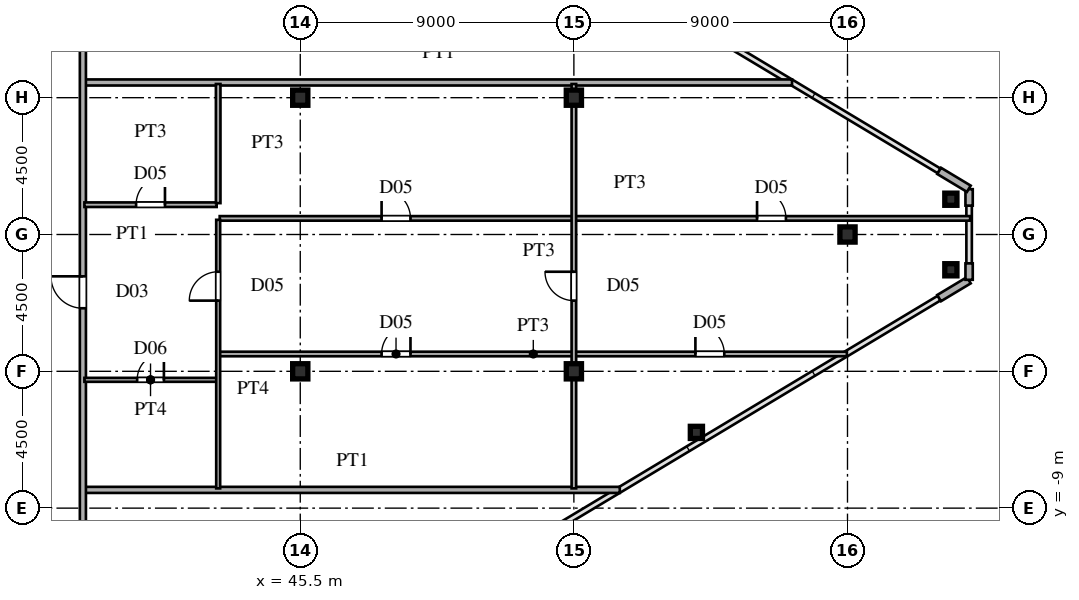
"""IFC4 building model, lengths in metres.
Left out: names, types, materials, properties, quantities, classifications, styles, units other than length and angle.
Written with IfcOpenShell. Run it as: python <this file> out.ifc"""

import sys

from ifc_helpers import new_model, si_unit, direction, frame, frame_2d, origin, origin_2d, place, context, subcontext, project, spatial, rectangle, hollow_rectangle, i_section, extrude, source, transform, mapped, element, fill, save


model = new_model("IFC4")
c1 = context("Model", 3, precision=1e-05, world=origin(), true_north=direction((0.0, 1.0)))
c2 = subcontext(c1, "Body", "Model", "MODEL_VIEW")
j1 = project(units=[si_unit("LENGTHUNIT", "METRE"), si_unit("PLANEANGLEUNIT", "RADIAN")], contexts=[c1])
p1 = place(None, origin())
s1 = spatial("IfcSite", under=j1, at=p1, CompositionType="ELEMENT")
p2 = place(p1, origin())
s2 = spatial("IfcBuilding", under=s1, at=p2, CompositionType="ELEMENT")
p3 = place(p2, frame((0.0, 0.0, 217.5)))
s3 = spatial("IfcBuildingStorey", under=s2, at=p3, CompositionType="ELEMENT", Elevation=217.5)
m1 = source(origin(), c2, "Body", "SweptSolid", [
    extrude(i_section(OverallWidth=0.5, OverallDepth=0.5, WebThickness=0.02, FlangeThickness=0.032, at=origin_2d()), origin(), (0.0, 0.0, 1.0), 3.6),
])
for number, where, z_axis, x_axis in (
    (1, (45.5, -4.5, 0.0), (0.0, 0.0, 1.0), (1.0, 0.0, 0.0)),
    (2, (45.5, 4.5, 0.0), (0.0, 0.0, 1.0), (1.0, 0.0, 0.0)),
    (3, (54.5, -4.5, 0.0), (0.0, 0.0, 1.0), (1.0, 0.0, 0.0)),
    (4, (54.5, 4.5, 0.0), (0.0, 0.0, 1.0), (1.0, 0.0, 0.0)),
    (5, (63.5, 0.0, 0.0), (0.0, 0.0, 1.0), (1.0, 0.0, 0.0)),
):
    element("IfcColumn", number, at=place(p3, frame(where, z_axis=z_axis, x_axis=x_axis)), inside=s3, PredefinedType="COLUMN", context=c2, shape_type="MappedRepresentation", body=[
        mapped(m1, transform((0.0, 0.0, 0.0), scale=1.0)),
    ])
m2 = source(origin(), c2, "Body", "SweptSolid", [
    extrude(hollow_rectangle(XDim=0.4, YDim=0.4, WallThickness=0.016, at=origin_2d()), origin(), (0.0, 0.0, 1.0), 3.6),
])
for number, where, z_axis, x_axis in (
    (6, (66.9, -1.16, 0.0), (0.0, 0.0, 1.0), (1.0, 0.0, 0.0)),
    (7, (66.9, 1.16, 0.0), (0.0, 0.0, 1.0), (1.0, 0.0, 0.0)),
    (8, (58.53, -6.509, 0.0), (0.0, 0.0, 1.0), (1.0, 0.0, 0.0)),
):
    element("IfcColumn", number, at=place(p3, frame(where, z_axis=z_axis, x_axis=x_axis)), inside=s3, PredefinedType="COLUMN", context=c2, shape_type="MappedRepresentation", body=[
        mapped(m2, transform((0.0, 0.0, 0.0), scale=1.0)),
    ])
p4 = place(p3, frame((66.514, -2.092, 0.0), z_axis=(0.0, 0.0, 1.0), x_axis=(0.85743623509, 0.514590228002, 0.0)))
e9 = element("IfcWall", 9, at=p4, inside=s3, PredefinedType="SOLIDWALL", context=c2, shape_type="SweptSolid", body=[
    extrude(rectangle(XDim=1.14, YDim=0.24, at=frame_2d((0.57, 0.0))), origin(), (0.0, 0.0, 1.0), 3.38),
])
for number, where, z_axis, x_axis in (
    (10, (67.5, -1.49, 0.0), (0.0, 0.0, 1.0), (0.0, 1.0, 0.0)),
    (11, (67.5, 0.95, 0.0), (0.0, 0.0, 1.0), (0.0, 1.0, 0.0)),
):
    element("IfcWall", number, at=place(p3, frame(where, z_axis=z_axis, x_axis=x_axis)), inside=s3, PredefinedType="SOLIDWALL", context=c2, shape_type="SweptSolid", body=[
        extrude(rectangle(XDim=0.54, YDim=0.24, at=frame_2d((0.27, 0.0))), origin(), (0.0, 0.0, 1.0), 3.38),
    ])
p5 = place(p3, frame((67.491, 1.505, 0.0), z_axis=(0.0, 0.0, 1.0), x_axis=(-0.85743623509, 0.514590228002, 0.0)))
e12 = element("IfcWall", 12, at=p5, inside=s3, PredefinedType="SOLIDWALL", context=c2, shape_type="SweptSolid", body=[
    extrude(rectangle(XDim=1.14, YDim=0.24, at=frame_2d((0.57, 0.0))), origin(), (0.0, 0.0, 1.0), 3.38),
])
p6 = place(p3, frame((38.43, -8.4, 0.0), z_axis=(0.0, 0.0, 1.0), x_axis=(1.0, 0.0, 0.0)))
e13 = element("IfcWall", 13, at=p6, inside=s3, PredefinedType="PARTITIONING", context=c2, shape_type="SweptSolid", body=[
    extrude(rectangle(XDim=17.58, YDim=0.2, at=frame_2d((8.79, 0.0))), origin(), (0.0, 0.0, 1.0), 3.38),
])
p7 = place(p3, frame((38.4, -4.78, 0.0), z_axis=(0.0, 0.0, 1.0), x_axis=(1.0, 0.0, 0.0)))
e14 = element("IfcWall", 14, at=p7, inside=s3, PredefinedType="PARTITIONING", context=c2, shape_type="SweptSolid", body=[
    extrude(rectangle(XDim=4.35, YDim=0.13, at=frame_2d((2.175, 0.0))), origin(), (0.0, 0.0, 1.0), 3.38),
])
p8 = place(p7, frame((1.735, 0.0, 0.0)))
e15 = element("IfcOpeningElement", 15, at=p8, cuts=e14, PredefinedType="OPENING", context=c2, shape_type="SweptSolid", body=[
    extrude(rectangle(XDim=0.88, YDim=2.1, at=frame_2d((0.44, 1.05))), frame((0.0, 0.075, 0.0), z_axis=(0.0, -1.0, 0.0), x_axis=(1.0, 0.0, 0.0)), (0.0, 0.0, 1.0), 0.15),
])
p9 = place(p3, frame((42.85, -3.93, 0.0), z_axis=(0.0, 0.0, 1.0), x_axis=(1.0, 0.0, 0.0)))
e16 = element("IfcWall", 16, at=p9, inside=s3, PredefinedType="PARTITIONING", context=c2, shape_type="SweptSolid", body=[
    extrude(rectangle(XDim=20.63, YDim=0.15, at=frame_2d((10.315, 0.0))), origin(), (0.0, 0.0, 1.0), 3.38),
])
p10 = place(p9, frame((5.325, 0.0, 0.0)))
e17 = element("IfcOpeningElement", 17, at=p10, cuts=e16, PredefinedType="OPENING", context=c2, shape_type="SweptSolid", body=[
    extrude(rectangle(XDim=0.95, YDim=2.15, at=frame_2d((0.475, 1.075))), frame((0.0, 0.085, 0.0), z_axis=(0.0, -1.0, 0.0), x_axis=(1.0, 0.0, 0.0)), (0.0, 0.0, 1.0), 0.17),
])
p11 = place(p9, frame((15.647, 0.0, 0.0)))
e18 = element("IfcOpeningElement", 18, at=p11, cuts=e16, PredefinedType="OPENING", context=c2, shape_type="SweptSolid", body=[
    extrude(rectangle(XDim=0.95, YDim=2.15, at=frame_2d((0.475, 1.075))), frame((0.0, 0.085, 0.0), z_axis=(0.0, -1.0, 0.0), x_axis=(1.0, 0.0, 0.0)), (0.0, 0.0, 1.0), 0.17),
])
p12 = place(p3, frame((42.85, 0.53, 0.0), z_axis=(0.0, 0.0, 1.0), x_axis=(1.0, 0.0, 0.0)))
e19 = element("IfcWall", 19, at=p12, inside=s3, PredefinedType="PARTITIONING", context=c2, shape_type="SweptSolid", body=[
    extrude(rectangle(XDim=24.685, YDim=0.15, at=frame_2d((12.342, 0.0))), origin(), (0.0, 0.0, 1.0), 3.38),
])
p13 = place(p12, frame((5.325, 0.0, 0.0)))
e20 = element("IfcOpeningElement", 20, at=p13, cuts=e19, PredefinedType="OPENING", context=c2, shape_type="SweptSolid", body=[
    extrude(rectangle(XDim=0.95, YDim=2.15, at=frame_2d((0.475, 1.075))), frame((0.0, 0.085, 0.0), z_axis=(0.0, -1.0, 0.0), x_axis=(1.0, 0.0, 0.0)), (0.0, 0.0, 1.0), 0.17),
])
p14 = place(p12, frame((17.675, 0.0, 0.0)))
e21 = element("IfcOpeningElement", 21, at=p14, cuts=e19, PredefinedType="OPENING", context=c2, shape_type="SweptSolid", body=[
    extrude(rectangle(XDim=0.95, YDim=2.15, at=frame_2d((0.475, 1.075))), frame((0.0, 0.085, 0.0), z_axis=(0.0, -1.0, 0.0), x_axis=(1.0, 0.0, 0.0)), (0.0, 0.0, 1.0), 0.17),
])
p15 = place(p3, frame((38.4, 0.98, 0.0), z_axis=(0.0, 0.0, 1.0), x_axis=(1.0, 0.0, 0.0)))
e22 = element("IfcWall", 22, at=p15, inside=s3, PredefinedType="PARTITIONING", context=c2, shape_type="SweptSolid", body=[
    extrude(rectangle(XDim=4.35, YDim=0.15, at=frame_2d((2.175, 0.0))), origin(), (0.0, 0.0, 1.0), 3.38),
])
p16 = place(p15, frame((1.7, 0.0, 0.0)))
e23 = element("IfcOpeningElement", 23, at=p16, cuts=e22, PredefinedType="OPENING", context=c2, shape_type="SweptSolid", body=[
    extrude(rectangle(XDim=0.95, YDim=2.15, at=frame_2d((0.475, 1.075))), frame((0.0, 0.085, 0.0), z_axis=(0.0, -1.0, 0.0), x_axis=(1.0, 0.0, 0.0)), (0.0, 0.0, 1.0), 0.17),
])
p17 = place(p3, frame((38.43, 5.0, 0.0), z_axis=(0.0, 0.0, 1.0), x_axis=(1.0, 0.0, 0.0)))
e24 = element("IfcWall", 24, at=p17, inside=s3, PredefinedType="PARTITIONING", context=c2, shape_type="SweptSolid", body=[
    extrude(rectangle(XDim=23.246, YDim=0.2, at=frame_2d((11.623, 0.0))), origin(), (0.0, 0.0, 1.0), 3.38),
])
p18 = place(p3, frame((38.35, -15.715, 0.0), z_axis=(0.0, 0.0, 1.0), x_axis=(0.0, 1.0, 0.0)))
e25 = element("IfcWall", 25, at=p18, inside=s3, PredefinedType="PARTITIONING", context=c2, shape_type="SweptSolid", body=[
    extrude(rectangle(XDim=31.43, YDim=0.2, at=frame_2d((15.715, 0.0))), origin(), (0.0, 0.0, 1.0), 3.38),
])
p19 = place(p18, frame((3.09, 0.0, 0.0)))
e26 = element("IfcOpeningElement", 26, at=p19, cuts=e25, PredefinedType="OPENING", context=c2, shape_type="SweptSolid", body=[
    extrude(rectangle(XDim=1.05, YDim=2.25, at=frame_2d((0.525, 1.125))), frame((0.0, 0.11, 0.0), z_axis=(0.0, -1.0, 0.0), x_axis=(1.0, 0.0, 0.0)), (0.0, 0.0, 1.0), 0.22),
])
p20 = place(p18, frame((13.289, 0.0, 0.0)))
e27 = element("IfcOpeningElement", 27, at=p20, cuts=e25, PredefinedType="OPENING", context=c2, shape_type="SweptSolid", body=[
    extrude(rectangle(XDim=1.05, YDim=2.25, at=frame_2d((0.525, 1.125))), frame((0.0, 0.11, 0.0), z_axis=(0.0, -1.0, 0.0), x_axis=(1.0, 0.0, 0.0)), (0.0, 0.0, 1.0), 0.22),
])
p21 = place(p18, frame((25.59, 0.0, 0.0)))
e28 = element("IfcOpeningElement", 28, at=p21, cuts=e25, PredefinedType="OPENING", context=c2, shape_type="SweptSolid", body=[
    extrude(rectangle(XDim=1.05, YDim=2.25, at=frame_2d((0.525, 1.125))), frame((0.0, 0.11, 0.0), z_axis=(0.0, -1.0, 0.0), x_axis=(1.0, 0.0, 0.0)), (0.0, 0.0, 1.0), 0.22),
])
p22 = place(p3, frame((42.8, -8.35, 0.0), z_axis=(0.0, 0.0, 1.0), x_axis=(0.0, 1.0, 0.0)))
e29 = element("IfcWall", 29, at=p22, inside=s3, PredefinedType="PARTITIONING", context=c2, shape_type="SweptSolid", body=[
    extrude(rectangle(XDim=8.833, YDim=0.13, at=frame_2d((4.417, 0.0))), origin(), (0.0, 0.0, 1.0), 3.38),
])
p23 = place(p22, frame((6.175, 0.0, 0.0)))
e30 = element("IfcOpeningElement", 30, at=p23, cuts=e29, PredefinedType="OPENING", context=c2, shape_type="SweptSolid", body=[
    extrude(rectangle(XDim=0.95, YDim=2.15, at=frame_2d((0.475, 1.075))), frame((0.0, 0.075, 0.0), z_axis=(0.0, -1.0, 0.0), x_axis=(1.0, 0.0, 0.0)), (0.0, 0.0, 1.0), 0.15),
])
p24 = place(p3, frame((42.8, 1.032, 0.0), z_axis=(0.0, 0.0, 1.0), x_axis=(0.0, 1.0, 0.0)))
e31 = element("IfcWall", 31, at=p24, inside=s3, PredefinedType="PARTITIONING", context=c2, shape_type="SweptSolid", body=[
    extrude(rectangle(XDim=3.918, YDim=0.15, at=frame_2d((1.959, 0.0))), origin(), (0.0, 0.0, 1.0), 3.38),
])
p25 = place(p3, frame((54.5, -8.35, 0.0), z_axis=(0.0, 0.0, 1.0), x_axis=(0.0, 1.0, 0.0)))
e32 = element("IfcWall", 32, at=p25, inside=s3, PredefinedType="PARTITIONING", context=c2, shape_type="SweptSolid", body=[
    extrude(rectangle(XDim=13.3, YDim=0.15, at=frame_2d((6.65, 0.0))), origin(), (0.0, 0.0, 1.0), 2.78),
])
p26 = place(p25, frame((6.175, 0.0, 0.0)))
e33 = element("IfcOpeningElement", 33, at=p26, cuts=e32, PredefinedType="OPENING", context=c2, shape_type="SweptSolid", body=[
    extrude(rectangle(XDim=0.95, YDim=2.15, at=frame_2d((0.475, 1.075))), frame((0.0, 0.085, 0.0), z_axis=(0.0, -1.0, 0.0), x_axis=(1.0, 0.0, 0.0)), (0.0, 0.0, 1.0), 0.17),
])
m3 = source(origin(), c2, "Body", "SweptSolid", [
    extrude(rectangle(XDim=0.88, YDim=2.1, at=frame_2d((0.44, 1.05))), frame((0.0, 0.025, 0.0), z_axis=(0.0, -1.0, 0.0), x_axis=(1.0, 0.0, 0.0)), (0.0, 0.0, 1.0), 0.05),
])
p27 = place(p8, origin())
e34 = element("IfcDoor", 34, at=p27, inside=s3, OperationType="SINGLE_SWING_RIGHT", PredefinedType="DOOR", context=c2, shape_type="MappedRepresentation", body=[
    mapped(m3, transform((0.0, 0.0, 0.0), scale=1.0)),
])
fill(e15, e34)
m4 = source(origin(), c2, "Body", "SweptSolid", [
    extrude(rectangle(XDim=0.95, YDim=2.15, at=frame_2d((0.475, 1.075))), frame((0.0, 0.025, 0.0), z_axis=(0.0, -1.0, 0.0), x_axis=(1.0, 0.0, 0.0)), (0.0, 0.0, 1.0), 0.05),
])
p28 = place(p10, origin())
e35 = element("IfcDoor", 35, at=p28, inside=s3, OperationType="SINGLE_SWING_RIGHT", PredefinedType="DOOR", context=c2, shape_type="MappedRepresentation", body=[
    mapped(m4, transform((0.0, 0.0, 0.0), scale=1.0)),
])
fill(e17, e35)
p29 = place(p11, origin())
e36 = element("IfcDoor", 36, at=p29, inside=s3, OperationType="SINGLE_SWING_LEFT", PredefinedType="DOOR", context=c2, shape_type="MappedRepresentation", body=[
    mapped(m4, transform((0.0, 0.0, 0.0), scale=1.0)),
])
fill(e18, e36)
p30 = place(p13, origin())
e37 = element("IfcDoor", 37, at=p30, inside=s3, OperationType="SINGLE_SWING_LEFT", PredefinedType="DOOR", context=c2, shape_type="MappedRepresentation", body=[
    mapped(m4, transform((0.0, 0.0, 0.0), scale=1.0)),
])
fill(e20, e37)
p31 = place(p14, origin())
e38 = element("IfcDoor", 38, at=p31, inside=s3, OperationType="SINGLE_SWING_LEFT", PredefinedType="DOOR", context=c2, shape_type="MappedRepresentation", body=[
    mapped(m4, transform((0.0, 0.0, 0.0), scale=1.0)),
])
fill(e21, e38)
p32 = place(p16, origin())
e39 = element("IfcDoor", 39, at=p32, inside=s3, OperationType="SINGLE_SWING_RIGHT", PredefinedType="DOOR", context=c2, shape_type="MappedRepresentation", body=[
    mapped(m4, transform((0.0, 0.0, 0.0), scale=1.0)),
])
fill(e23, e39)
m5 = source(origin(), c2, "Body", "SweptSolid", [
    extrude(rectangle(XDim=1.05, YDim=2.25, at=frame_2d((0.525, 1.125))), frame((0.0, 0.025, 0.0), z_axis=(0.0, -1.0, 0.0), x_axis=(1.0, 0.0, 0.0)), (0.0, 0.0, 1.0), 0.05),
])
p33 = place(p20, origin())
e40 = element("IfcDoor", 40, at=p33, inside=s3, OperationType="SINGLE_SWING_RIGHT", PredefinedType="DOOR", context=c2, shape_type="MappedRepresentation", body=[
    mapped(m5, transform((0.0, 0.0, 0.0), scale=1.0)),
])
fill(e27, e40)
p34 = place(p23, origin())
e41 = element("IfcDoor", 41, at=p34, inside=s3, OperationType="SINGLE_SWING_LEFT", PredefinedType="DOOR", context=c2, shape_type="MappedRepresentation", body=[
    mapped(m4, transform((0.0, 0.0, 0.0), scale=1.0)),
])
fill(e30, e41)
p35 = place(p26, origin())
e42 = element("IfcDoor", 42, at=p35, inside=s3, OperationType="SINGLE_SWING_RIGHT", PredefinedType="DOOR", context=c2, shape_type="MappedRepresentation", body=[
    mapped(m4, transform((0.0, 0.0, 0.0), scale=1.0)),
])
fill(e33, e42)
save(model, sys.argv[1])
